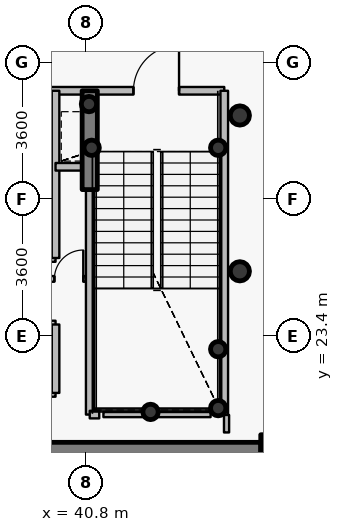
"""IFC4 building model, lengths in metres.
Left out: names, types, materials, properties, quantities, classifications, styles, units other than length and angle.
Written with IfcOpenShell. Run it as: python <this file> out.ifc"""

import sys

from ifc_helpers import new_model, si_unit, direction, frame, frame_2d, origin, origin_2d, place, context, subcontext, project, spatial, rectangle, hollow_circle, extrude, source, transform, mapped, element, fill, save


model = new_model("IFC4")
c1 = context("Model", 3, precision=1e-05, world=origin(), true_north=direction((0.0, 1.0)))
c2 = subcontext(c1, "Body", "Model", "MODEL_VIEW")
j1 = project(units=[si_unit("LENGTHUNIT", "METRE"), si_unit("PLANEANGLEUNIT", "RADIAN")], contexts=[c1])
p1 = place(None, origin())
s1 = spatial("IfcSite", under=j1, at=p1, CompositionType="ELEMENT")
p2 = place(p1, origin())
s2 = spatial("IfcBuilding", under=s1, at=p2, CompositionType="ELEMENT")
p3 = place(p2, frame((0.0, 0.0, 134.7)))
s3 = spatial("IfcBuildingStorey", under=s2, at=p3, CompositionType="ELEMENT", Elevation=134.7)
p4 = place(p3, frame((46.0, 20.2, 0.0), z_axis=(0.0, 0.0, 1.0), x_axis=(1.0, 0.0, 0.0)))
e1 = element("IfcColumn", 1, at=p4, inside=s3, PredefinedType="COLUMN", context=c2, shape_type="SweptSolid", body=[
    extrude(rectangle(XDim=1.2, YDim=1.2, at=origin_2d()), origin(), (0.0, 0.0, 1.0), 3.75),
])
for number, where, z_axis, x_axis in (
    (2, (44.28, 21.5, 0.0), (0.0, 0.0, 1.0), (1.0, 0.0, 0.0)),
    (3, (44.28, 23.05, 0.0), (0.0, 0.0, 1.0), (1.0, 0.0, 0.0)),
    (4, (42.5, 21.4, 0.0), (0.0, 0.0, 1.0), (1.0, 0.0, 0.0)),
    (5, (40.95, 28.35, 0.0), (0.0, 0.0, 1.0), (1.0, 0.0, 0.0)),
    (6, (44.28, 28.35, 0.0), (0.0, 0.0, 1.0), (1.0, 0.0, 0.0)),
    (7, (40.88, 29.5, 0.0), (0.0, 0.0, 1.0), (1.0, 0.0, 0.0)),
):
    element("IfcColumn", number, at=place(p3, frame(where, z_axis=z_axis, x_axis=x_axis)), inside=s3, PredefinedType="COLUMN", context=c2, shape_type="SweptSolid", body=[
        extrude(hollow_circle(Radius=0.203, WallThickness=0.016, at=origin_2d()), origin(), (0.0, 0.0, 1.0), 3.75),
    ])
p5 = place(p3, frame((45.4, 20.2, 0.0), z_axis=(0.0, 0.0, 1.0), x_axis=(-1.0, 0.0, 0.0)))
e8 = element("IfcWall", 8, at=p5, inside=s3, PredefinedType="SHEAR", context=c2, shape_type="SweptSolid", body=[
    extrude(rectangle(XDim=18.8, YDim=0.8, at=frame_2d((9.4, 0.0))), origin(), (0.0, 0.0, 1.0), 2.95),
])
p6 = place(p5, frame((10.15, 0.0, 0.0)))
e9 = element("IfcOpeningElement", 9, at=p6, cuts=e8, PredefinedType="OPENING", context=c2, shape_type="SweptSolid", body=[
    extrude(rectangle(XDim=1.15, YDim=2.15, at=origin_2d()), frame((0.575, 0.41, 1.075), z_axis=(0.0, -1.0, 0.0), x_axis=(1.0, 0.0, 0.0)), (0.0, 0.0, 1.0), 0.82),
])
p7 = place(p3, frame((40.9, 27.25, 0.0), z_axis=(0.0, 0.0, 1.0), x_axis=(0.0, 1.0, 0.0)))
e10 = element("IfcWall", 10, at=p7, inside=s3, PredefinedType="SHEAR", context=c2, shape_type="SweptSolid", body=[
    extrude(rectangle(XDim=2.6, YDim=0.4, at=frame_2d((1.3, 0.0))), origin(), (0.0, 0.0, 1.0), 3.1),
])
for number, where, z_axis, x_axis in (
    (11, (44.85, 25.1, 0.0), (0.0, 0.0, 1.0), (1.0, 0.0, 0.0)),
    (12, (44.85, 29.2, 0.0), (0.0, 0.0, 1.0), (1.0, 0.0, 0.0)),
):
    element("IfcColumn", number, at=place(p3, frame(where, z_axis=z_axis, x_axis=x_axis)), inside=s3, PredefinedType="COLUMN", context=c2, shape_type="SweptSolid", body=[
        extrude(hollow_circle(Radius=0.254, WallThickness=0.02, at=origin_2d()), origin(), (0.0, 0.0, 1.0), 3.75),
    ])
p8 = place(p3, frame((35.05, 27.25, 0.0), z_axis=(0.0, 0.0, 1.0), x_axis=(1.0, 0.0, 0.0)))
e13 = element("IfcWall", 13, at=p8, inside=s3, PredefinedType="PARTITIONING", context=c2, shape_type="SweptSolid", body=[
    extrude(rectangle(XDim=4.95, YDim=0.2, at=frame_2d((2.475, 0.0))), origin(), (0.0, 0.0, 1.0), 3.085),
])
p9 = place(p3, frame((35.45, 23.7, 0.0), z_axis=(0.0, 0.0, 1.0), x_axis=(1.0, 0.0, 0.0)))
e14 = element("IfcWall", 14, at=p9, inside=s3, PredefinedType="PARTITIONING", context=c2, shape_type="SweptSolid", body=[
    extrude(rectangle(XDim=4.55, YDim=0.2, at=frame_2d((2.275, 0.0))), origin(), (0.0, 0.0, 1.0), 3.085),
])
p10 = place(p9, frame((0.25, 0.0, 0.0)))
e15 = element("IfcOpeningElement", 15, at=p10, cuts=e14, PredefinedType="OPENING", context=c2, shape_type="SweptSolid", body=[
    extrude(rectangle(XDim=1.05, YDim=2.15, at=origin_2d()), frame((0.525, 0.11, 1.075), z_axis=(0.0, -1.0, 0.0), x_axis=(1.0, 0.0, 0.0)), (0.0, 0.0, 1.0), 0.22),
])
p11 = place(p9, frame((1.745, 0.0, 0.0)))
e16 = element("IfcOpeningElement", 16, at=p11, cuts=e14, PredefinedType="OPENING", context=c2, shape_type="SweptSolid", body=[
    extrude(rectangle(XDim=1.05, YDim=2.15, at=origin_2d()), frame((0.525, 0.11, 1.075), z_axis=(0.0, -1.0, 0.0), x_axis=(1.0, 0.0, 0.0)), (0.0, 0.0, 1.0), 0.22),
])
p12 = place(p9, frame((3.165, 0.0, 0.0)))
e17 = element("IfcOpeningElement", 17, at=p12, cuts=e14, PredefinedType="OPENING", context=c2, shape_type="SweptSolid", body=[
    extrude(rectangle(XDim=1.05, YDim=2.15, at=origin_2d()), frame((0.525, 0.11, 1.075), z_axis=(0.0, -1.0, 0.0), x_axis=(1.0, 0.0, 0.0)), (0.0, 0.0, 1.0), 0.22),
])
p13 = place(p3, frame((35.45, 25.45, 0.0), z_axis=(0.0, 0.0, 1.0), x_axis=(1.0, 0.0, 0.0)))
e18 = element("IfcWall", 18, at=p13, inside=s3, PredefinedType="PARTITIONING", context=c2, shape_type="SweptSolid", body=[
    extrude(rectangle(XDim=4.55, YDim=0.2, at=frame_2d((2.275, 0.0))), origin(), (0.0, 0.0, 1.0), 3.085),
])
p14 = place(p3, frame((35.95, 29.85, 0.0), z_axis=(0.0, 0.0, 1.0), x_axis=(1.0, 0.0, 0.0)))
e19 = element("IfcWall", 19, at=p14, inside=s3, PredefinedType="PARTITIONING", context=c2, shape_type="SweptSolid", body=[
    extrude(rectangle(XDim=8.49, YDim=0.2, at=frame_2d((4.245, 0.0))), origin(), (0.0, 0.0, 1.0), 3.085),
])
p15 = place(p14, frame((6.1, 0.0, 0.0)))
e20 = element("IfcOpeningElement", 20, at=p15, cuts=e19, PredefinedType="OPENING", context=c2, shape_type="SweptSolid", body=[
    extrude(rectangle(XDim=1.2, YDim=2.15, at=origin_2d()), frame((0.6, 0.11, 1.075), z_axis=(0.0, -1.0, 0.0), x_axis=(1.0, 0.0, 0.0)), (0.0, 0.0, 1.0), 0.22),
])
p16 = place(p14, frame((0.37, 0.0, 0.0)))
e21 = element("IfcOpeningElement", 21, at=p16, cuts=e19, PredefinedType="OPENING", context=c2, shape_type="SweptSolid", body=[
    extrude(rectangle(XDim=1.15, YDim=2.15, at=origin_2d()), frame((0.575, 0.11, 1.075), z_axis=(0.0, -1.0, 0.0), x_axis=(1.0, 0.0, 0.0)), (0.0, 0.0, 1.0), 0.22),
])
p17 = place(p14, frame((2.425, 0.0, 0.0)))
e22 = element("IfcOpeningElement", 22, at=p17, cuts=e19, PredefinedType="OPENING", context=c2, shape_type="SweptSolid", body=[
    extrude(rectangle(XDim=1.05, YDim=2.15, at=origin_2d()), frame((0.525, 0.11, 1.075), z_axis=(0.0, -1.0, 0.0), x_axis=(1.0, 0.0, 0.0)), (0.0, 0.0, 1.0), 0.22),
])
p18 = place(p3, frame((39.8, 21.9, 0.0), z_axis=(0.0, 0.0, 1.0), x_axis=(1.0, 0.0, 0.0)))
e23 = element("IfcWall", 23, at=p18, inside=s3, PredefinedType="PARTITIONING", context=c2, shape_type="SweptSolid", body=[
    extrude(rectangle(XDim=0.2, YDim=0.2, at=frame_2d((0.1, 0.0))), origin(), (0.0, 0.0, 1.0), 3.5),
])
p19 = place(p3, frame((39.8, 24.9, 0.0), z_axis=(0.0, 0.0, 1.0), x_axis=(1.0, 0.0, 0.0)))
e24 = element("IfcWall", 24, at=p19, inside=s3, PredefinedType="PARTITIONING", context=c2, shape_type="SweptSolid", body=[
    extrude(rectangle(XDim=1.1, YDim=0.15, at=frame_2d((0.55, 0.0))), origin(), (0.0, 0.0, 1.0), 3.5),
])
p20 = place(p19, frame((0.17, 0.0, 0.0)))
e25 = element("IfcOpeningElement", 25, at=p20, cuts=e24, PredefinedType="OPENING", context=c2, shape_type="SweptSolid", body=[
    extrude(rectangle(XDim=0.76, YDim=2.1, at=origin_2d()), frame((0.38, 0.085, 1.05), z_axis=(0.0, -1.0, 0.0), x_axis=(1.0, 0.0, 0.0)), (0.0, 0.0, 1.0), 0.17),
])
p21 = place(p3, frame((40.0, 21.9, 0.0), z_axis=(0.0, 0.0, 1.0), x_axis=(0.0, 1.0, 0.0)))
e26 = element("IfcWall", 26, at=p21, inside=s3, PredefinedType="PARTITIONING", context=c2, shape_type="SweptSolid", body=[
    extrude(rectangle(XDim=1.8, YDim=0.2, at=frame_2d((0.9, 0.0))), origin(), (0.0, 0.0, 1.0), 3.5),
])
p22 = place(p3, frame((40.0, 25.45, 0.0), z_axis=(0.0, 0.0, 1.0), x_axis=(0.0, 1.0, 0.0)))
e27 = element("IfcWall", 27, at=p22, inside=s3, PredefinedType="PARTITIONING", context=c2, shape_type="SweptSolid", body=[
    extrude(rectangle(XDim=4.4, YDim=0.2, at=frame_2d((2.2, 0.0))), origin(), (0.0, 0.0, 1.0), 3.5),
])
p23 = place(p3, frame((40.0, 27.85, 0.0), z_axis=(0.0, 0.0, 1.0), x_axis=(1.0, 0.0, 0.0)))
e28 = element("IfcWall", 28, at=p23, inside=s3, PredefinedType="PARTITIONING", context=c2, shape_type="SweptSolid", body=[
    extrude(rectangle(XDim=0.9, YDim=0.2, at=frame_2d((0.45, 0.0))), origin(), (0.0, 0.0, 1.0), 3.5),
])
p24 = place(p3, frame((40.9, 21.33, 0.0), z_axis=(0.0, 0.0, 1.0), x_axis=(0.0, 1.0, 0.0)))
e29 = element("IfcWall", 29, at=p24, inside=s3, PredefinedType="PARTITIONING", context=c2, shape_type="SweptSolid", body=[
    extrude(rectangle(XDim=5.91, YDim=0.2, at=frame_2d((2.955, 0.0))), origin(), (0.0, 0.0, 1.0), 3.035),
])
p25 = place(p3, frame((40.9, 21.33, 0.0), z_axis=(0.0, 0.0, 1.0), x_axis=(1.0, 0.0, 0.0)))
e30 = element("IfcWall", 30, at=p25, inside=s3, PredefinedType="PARTITIONING", context=c2, shape_type="SweptSolid", body=[
    extrude(rectangle(XDim=0.25, YDim=0.2, at=frame_2d((0.125, 0.0))), origin(), (0.0, 0.0, 1.0), 3.035),
])
p26 = place(p3, frame((44.44, 21.33, 0.0), z_axis=(0.0, 0.0, 1.0), x_axis=(0.0, 1.0, 0.0)))
e31 = element("IfcWall", 31, at=p26, inside=s3, PredefinedType="PARTITIONING", context=c2, shape_type="SweptSolid", body=[
    extrude(rectangle(XDim=8.52, YDim=0.2, at=frame_2d((4.26, 0.0))), origin(), (0.0, 0.0, 1.0), 3.5),
])
p27 = place(p3, frame((44.08, 21.33, 0.0), z_axis=(0.0, 0.0, 1.0), x_axis=(-1.0, 0.0, 0.0)))
e32 = element("IfcWall", 32, at=p27, inside=s3, PredefinedType="PARTITIONING", context=c2, shape_type="SweptSolid", body=[
    extrude(rectangle(XDim=2.82, YDim=0.135, at=frame_2d((1.41, 0.0))), origin(), (0.0, 0.0, 1.0), 3.035),
])
p28 = place(p3, frame((44.5, 20.86, 0.0), z_axis=(0.0, 0.0, 1.0), x_axis=(0.0, 1.0, 0.0)))
e33 = element("IfcWall", 33, at=p28, inside=s3, PredefinedType="PARTITIONING", context=c2, shape_type="SweptSolid", body=[
    extrude(rectangle(XDim=0.46, YDim=0.135, at=frame_2d((0.23, 0.0))), origin(), (0.0, 0.0, 1.0), 3.5),
])
m1 = source(origin(), c2, "Body", "SweptSolid", [
    extrude(rectangle(XDim=1.2, YDim=2.15, at=origin_2d()), frame((0.6, 0.025, 1.075), z_axis=(0.0, -1.0, 0.0), x_axis=(1.0, 0.0, 0.0)), (0.0, 0.0, 1.0), 0.05),
])
p29 = place(p15, origin())
e34 = element("IfcDoor", 34, at=p29, inside=s3, OperationType="SINGLE_SWING_RIGHT", PredefinedType="DOOR", context=c2, shape_type="MappedRepresentation", body=[
    mapped(m1, transform((0.0, 0.0, 0.0), x_axis=(1.0, 0.0, 0.0), y_axis=(0.0, 1.0, 0.0), z_axis=(0.0, 0.0, 1.0), scale=1.0)),
])
fill(e20, e34)
m2 = source(origin(), c2, "Body", "SweptSolid", [
    extrude(rectangle(XDim=0.76, YDim=2.1, at=origin_2d()), frame((0.38, 0.025, 1.05), z_axis=(0.0, -1.0, 0.0), x_axis=(1.0, 0.0, 0.0)), (0.0, 0.0, 1.0), 0.05),
])
p30 = place(p20, origin())
e35 = element("IfcDoor", 35, at=p30, inside=s3, OperationType="SINGLE_SWING_RIGHT", PredefinedType="DOOR", context=c2, shape_type="MappedRepresentation", body=[
    mapped(m2, transform((0.0, 0.0, 0.0), x_axis=(1.0, 0.0, 0.0), y_axis=(0.0, 1.0, 0.0), z_axis=(0.0, 0.0, 1.0), scale=1.0)),
])
fill(e25, e35)
save(model, sys.argv[1])
